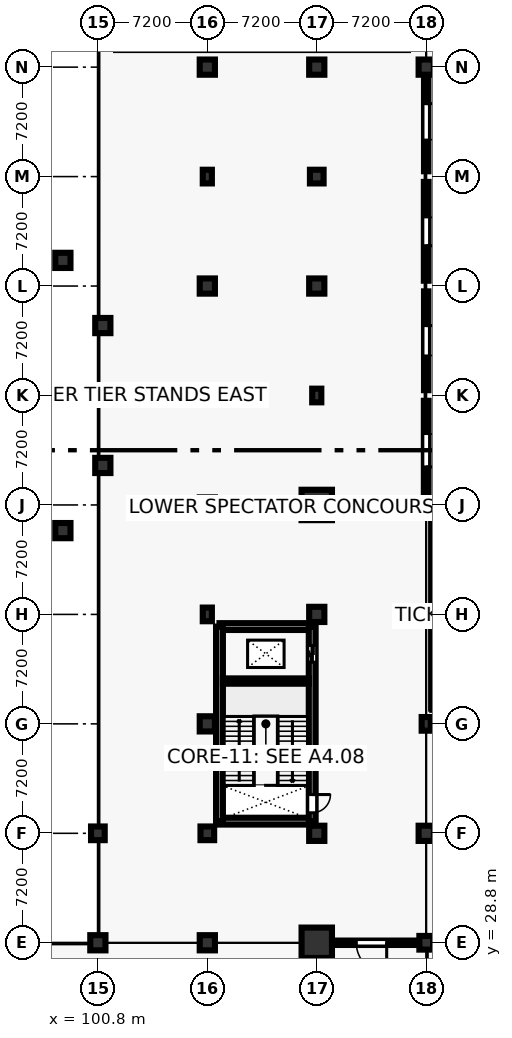
"""IFC4 building model, lengths in metres.
Left out: names, types, materials, properties, quantities, classifications, styles, units other than length and angle.
Written with IfcOpenShell. Run it as: python <this file> out.ifc"""

import sys

from ifc_helpers import new_model, si_unit, direction, frame, frame_2d, origin, origin_2d, place, context, subcontext, project, spatial, rectangle, circle, extrude, element, fill, save


model = new_model("IFC4")
c1 = context("Model", 3, precision=1e-05, world=origin(), true_north=direction((0.0, 1.0)))
c2 = subcontext(c1, "Body", "Model", "MODEL_VIEW")
j1 = project(units=[si_unit("LENGTHUNIT", "METRE"), si_unit("PLANEANGLEUNIT", "RADIAN")], contexts=[c1])
p1 = place(None, origin())
s1 = spatial("IfcSite", under=j1, at=p1, CompositionType="ELEMENT")
p2 = place(p1, origin())
s2 = spatial("IfcBuilding", under=s1, at=p2, CompositionType="ELEMENT")
p3 = place(p2, origin())
s3 = spatial("IfcBuildingStorey", under=s2, at=p3, CompositionType="ELEMENT", Elevation=0.0)
p4 = place(p3, frame((100.8, 28.8, 0.0), z_axis=(0.0, 0.0, 1.0), x_axis=(1.0, 0.0, 0.0)))
e1 = element("IfcColumn", 1, at=p4, inside=s3, PredefinedType="COLUMN", context=c2, shape_type="SweptSolid", body=[
    extrude(rectangle(XDim=1.0, YDim=1.0, at=origin_2d()), origin(), (0.0, 0.0, 1.0), 5.4),
])
p5 = place(p3, frame((100.8, 36.0, 0.0), z_axis=(0.0, 0.0, 1.0), x_axis=(1.0, 0.0, 0.0)))
e2 = element("IfcColumn", 2, at=p5, inside=s3, PredefinedType="COLUMN", context=c2, shape_type="SweptSolid", body=[
    extrude(rectangle(XDim=0.9, YDim=0.9, at=origin_2d()), origin(), (0.0, 0.0, 1.0), 5.4),
])
p6 = place(p3, frame((108.0, 28.8, 0.0), z_axis=(0.0, 0.0, 1.0), x_axis=(1.0, 0.0, 0.0)))
e3 = element("IfcColumn", 3, at=p6, inside=s3, PredefinedType="COLUMN", context=c2, shape_type="SweptSolid", body=[
    extrude(rectangle(XDim=1.0, YDim=1.0, at=origin_2d()), origin(), (0.0, 0.0, 1.0), 5.4),
])
p7 = place(p3, frame((108.0, 36.0, 0.0), z_axis=(0.0, 0.0, 1.0), x_axis=(1.0, 0.0, 0.0)))
e4 = element("IfcColumn", 4, at=p7, inside=s3, PredefinedType="COLUMN", context=c2, shape_type="SweptSolid", body=[
    extrude(rectangle(XDim=0.9, YDim=0.9, at=origin_2d()), origin(), (0.0, 0.0, 1.0), 5.4),
])
p8 = place(p3, frame((108.0, 43.2, 0.0), z_axis=(0.0, 0.0, 1.0), x_axis=(1.0, 0.0, 0.0)))
e5 = element("IfcColumn", 5, at=p8, inside=s3, PredefinedType="COLUMN", context=c2, shape_type="SweptSolid", body=[
    extrude(circle(Radius=0.5, at=origin_2d()), origin(), (0.0, 0.0, 1.0), 5.4),
])
p9 = place(p3, frame((108.0, 50.4, 0.0), z_axis=(0.0, 0.0, 1.0), x_axis=(1.0, 0.0, 0.0)))
e6 = element("IfcColumn", 6, at=p9, inside=s3, PredefinedType="COLUMN", context=c2, shape_type="SweptSolid", body=[
    extrude(rectangle(XDim=0.6, YDim=0.9, at=origin_2d()), origin(), (0.0, 0.0, 1.0), 5.4),
])
p10 = place(p3, frame((108.0, 57.6, 0.0), z_axis=(0.0, 0.0, 1.0), x_axis=(1.0, 0.0, 0.0)))
e7 = element("IfcColumn", 7, at=p10, inside=s3, PredefinedType="COLUMN", context=c2, shape_type="SweptSolid", body=[
    extrude(rectangle(XDim=1.0, YDim=1.0, at=origin_2d()), origin(), (0.0, 0.0, 1.0), 5.4),
])
p11 = place(p3, frame((108.0, 64.8, 0.0), z_axis=(0.0, 0.0, 1.0), x_axis=(1.0, 0.0, 0.0)))
e8 = element("IfcColumn", 8, at=p11, inside=s3, PredefinedType="COLUMN", context=c2, shape_type="SweptSolid", body=[
    extrude(rectangle(XDim=0.9, YDim=0.9, at=origin_2d()), origin(), (0.0, 0.0, 1.0), 5.4),
])
p12 = place(p3, frame((108.0, 72.0, 0.0), z_axis=(0.0, 0.0, 1.0), x_axis=(1.0, 0.0, 0.0)))
e9 = element("IfcColumn", 9, at=p12, inside=s3, PredefinedType="COLUMN", context=c2, shape_type="SweptSolid", body=[
    extrude(circle(Radius=0.5, at=origin_2d()), origin(), (0.0, 0.0, 1.0), 5.4),
])
p13 = place(p3, frame((108.0, 79.2, 0.0), z_axis=(0.0, 0.0, 1.0), x_axis=(1.0, 0.0, 0.0)))
e10 = element("IfcColumn", 10, at=p13, inside=s3, PredefinedType="COLUMN", context=c2, shape_type="SweptSolid", body=[
    extrude(rectangle(XDim=0.6, YDim=0.9, at=origin_2d()), origin(), (0.0, 0.0, 1.0), 5.4),
])
p14 = place(p3, frame((108.0, 86.4, 0.0), z_axis=(0.0, 0.0, 1.0), x_axis=(1.0, 0.0, 0.0)))
e11 = element("IfcColumn", 11, at=p14, inside=s3, PredefinedType="COLUMN", context=c2, shape_type="SweptSolid", body=[
    extrude(rectangle(XDim=1.0, YDim=1.0, at=origin_2d()), origin(), (0.0, 0.0, 1.0), 5.4),
])
p15 = place(p3, frame((115.2, 28.8, 0.0), z_axis=(0.0, 0.0, 1.0), x_axis=(1.0, 0.0, 0.0)))
e12 = element("IfcColumn", 12, at=p15, inside=s3, PredefinedType="COLUMN", context=c2, shape_type="SweptSolid", body=[
    extrude(circle(Radius=1.0, at=origin_2d()), origin(), (0.0, 0.0, 1.0), 5.4),
])
for number, where, z_axis, x_axis in (
    (13, (115.2, 36.0, 0.0), (0.0, 0.0, 1.0), (1.0, 0.0, 0.0)),
    (14, (115.2, 50.4, 0.0), (0.0, 0.0, 1.0), (1.0, 0.0, 0.0)),
):
    element("IfcColumn", number, at=place(p3, frame(where, z_axis=z_axis, x_axis=x_axis)), inside=s3, PredefinedType="COLUMN", context=c2, shape_type="SweptSolid", body=[
        extrude(circle(Radius=0.5, at=origin_2d()), origin(), (0.0, 0.0, 1.0), 5.4),
    ])
p16 = place(p3, frame((115.2, 57.6, 0.0), z_axis=(0.0, 0.0, 1.0), x_axis=(1.0, 0.0, 0.0)))
e15 = element("IfcColumn", 15, at=p16, inside=s3, PredefinedType="COLUMN", context=c2, shape_type="SweptSolid", body=[
    extrude(circle(Radius=1.0, at=origin_2d()), origin(), (0.0, 0.0, 1.0), 5.4),
])
p17 = place(p3, frame((115.2, 64.8, 0.0), z_axis=(0.0, 0.0, 1.0), x_axis=(1.0, 0.0, 0.0)))
e16 = element("IfcColumn", 16, at=p17, inside=s3, PredefinedType="COLUMN", context=c2, shape_type="SweptSolid", body=[
    extrude(rectangle(XDim=0.6, YDim=0.9, at=origin_2d()), origin(), (0.0, 0.0, 1.0), 5.4),
])
p18 = place(p3, frame((115.2, 72.0, 0.0), z_axis=(0.0, 0.0, 1.0), x_axis=(1.0, 0.0, 0.0)))
e17 = element("IfcColumn", 17, at=p18, inside=s3, PredefinedType="COLUMN", context=c2, shape_type="SweptSolid", body=[
    extrude(circle(Radius=0.5, at=origin_2d()), origin(), (0.0, 0.0, 1.0), 5.4),
])
p19 = place(p3, frame((115.2, 79.2, 0.0), z_axis=(0.0, 0.0, 1.0), x_axis=(1.0, 0.0, 0.0)))
e18 = element("IfcColumn", 18, at=p19, inside=s3, PredefinedType="COLUMN", context=c2, shape_type="SweptSolid", body=[
    extrude(rectangle(XDim=0.9, YDim=0.9, at=origin_2d()), origin(), (0.0, 0.0, 1.0), 5.4),
])
p20 = place(p3, frame((115.2, 86.4, 0.0), z_axis=(0.0, 0.0, 1.0), x_axis=(1.0, 0.0, 0.0)))
e19 = element("IfcColumn", 19, at=p20, inside=s3, PredefinedType="COLUMN", context=c2, shape_type="SweptSolid", body=[
    extrude(circle(Radius=0.5, at=origin_2d()), origin(), (0.0, 0.0, 1.0), 5.4),
])
p21 = place(p3, frame((122.4, 28.8, 0.0), z_axis=(0.0, 0.0, 1.0), x_axis=(1.0, 0.0, 0.0)))
e20 = element("IfcColumn", 20, at=p21, inside=s3, PredefinedType="COLUMN", context=c2, shape_type="SweptSolid", body=[
    extrude(rectangle(XDim=0.9, YDim=0.9, at=origin_2d()), origin(), (0.0, 0.0, 1.0), 5.4),
])
p22 = place(p3, frame((122.4, 36.0, 0.0), z_axis=(0.0, 0.0, 1.0), x_axis=(1.0, 0.0, 0.0)))
e21 = element("IfcColumn", 21, at=p22, inside=s3, PredefinedType="COLUMN", context=c2, shape_type="SweptSolid", body=[
    extrude(circle(Radius=0.5, at=origin_2d()), origin(), (0.0, 0.0, 1.0), 5.4),
])
p23 = place(p3, frame((122.4, 43.2, 0.0), z_axis=(0.0, 0.0, 1.0), x_axis=(1.0, 0.0, 0.0)))
e22 = element("IfcColumn", 22, at=p23, inside=s3, PredefinedType="COLUMN", context=c2, shape_type="SweptSolid", body=[
    extrude(rectangle(XDim=0.6, YDim=0.9, at=origin_2d()), origin(), (0.0, 0.0, 1.0), 5.4),
])
p24 = place(p3, frame((122.4, 50.4, 0.0), z_axis=(0.0, 0.0, 1.0), x_axis=(1.0, 0.0, 0.0)))
e23 = element("IfcColumn", 23, at=p24, inside=s3, PredefinedType="COLUMN", context=c2, shape_type="SweptSolid", body=[
    extrude(rectangle(XDim=1.0, YDim=1.0, at=origin_2d()), origin(), (0.0, 0.0, 1.0), 5.4),
])
p25 = place(p3, frame((122.4, 57.6, 0.0), z_axis=(0.0, 0.0, 1.0), x_axis=(1.0, 0.0, 0.0)))
e24 = element("IfcColumn", 24, at=p25, inside=s3, PredefinedType="COLUMN", context=c2, shape_type="SweptSolid", body=[
    extrude(rectangle(XDim=0.9, YDim=0.9, at=origin_2d()), origin(), (0.0, 0.0, 1.0), 5.4),
])
p26 = place(p3, frame((122.4, 86.4, 0.0), z_axis=(0.0, 0.0, 1.0), x_axis=(1.0, 0.0, 0.0)))
e25 = element("IfcColumn", 25, at=p26, inside=s3, PredefinedType="COLUMN", context=c2, shape_type="SweptSolid", body=[
    extrude(circle(Radius=0.5, at=origin_2d()), origin(), (0.0, 0.0, 1.0), 5.4),
])
for number, where, z_axis, x_axis in (
    (26, (108.8, 36.8, 0.0), (0.0, 0.0, 1.0), (1.0, 0.0, 0.0)),
    (27, (108.8, 49.6, 0.0), (0.0, 0.0, 1.0), (1.0, 0.0, 0.0)),
):
    element("IfcWall", number, at=place(p3, frame(where, z_axis=z_axis, x_axis=x_axis)), inside=s3, PredefinedType="SHEAR", context=c2, shape_type="SweptSolid", body=[
        extrude(rectangle(XDim=6.1, YDim=0.45, at=frame_2d((3.05, 0.0))), origin(), (0.0, 0.0, 1.0), 5.06),
    ])
p27 = place(p3, frame((108.8, 36.8, 0.0), z_axis=(0.0, 0.0, 1.0), x_axis=(0.0, 1.0, 0.0)))
e28 = element("IfcWall", 28, at=p27, inside=s3, PredefinedType="SHEAR", context=c2, shape_type="SweptSolid", body=[
    extrude(rectangle(XDim=12.8, YDim=0.45, at=frame_2d((6.4, 0.0))), origin(), (0.0, 0.0, 1.0), 5.06),
])
p28 = place(p3, frame((114.9, 36.8, 0.0), z_axis=(0.0, 0.0, 1.0), x_axis=(0.0, 1.0, 0.0)))
e29 = element("IfcWall", 29, at=p28, inside=s3, PredefinedType="SHEAR", context=c2, shape_type="SweptSolid", body=[
    extrude(rectangle(XDim=12.8, YDim=0.45, at=frame_2d((6.4, 0.0))), origin(), (0.0, 0.0, 1.0), 5.06),
])
p29 = place(p28, frame((0.55, 0.0, 0.0)))
e30 = element("IfcOpeningElement", 30, at=p29, cuts=e29, PredefinedType="OPENING", context=c2, shape_type="SweptSolid", body=[
    extrude(rectangle(XDim=1.2, YDim=2.25, at=frame_2d((0.6, 1.125))), frame((0.0, 0.235, 0.0), z_axis=(0.0, -1.0, 0.0), x_axis=(1.0, 0.0, 0.0)), (0.0, 0.0, 1.0), 0.47),
])
p30 = place(p28, frame((10.458, 0.0, 0.0)))
e31 = element("IfcOpeningElement", 31, at=p30, cuts=e29, PredefinedType="OPENING", context=c2, shape_type="SweptSolid", body=[
    extrude(rectangle(XDim=1.1, YDim=2.2, at=frame_2d((0.55, 1.1))), frame((0.0, 0.235, 0.0), z_axis=(0.0, -1.0, 0.0), x_axis=(1.0, 0.0, 0.0)), (0.0, 0.0, 1.0), 0.47),
])
p31 = place(p3, frame((109.025, 46.016, 0.0), z_axis=(0.0, 0.0, 1.0), x_axis=(1.0, 0.0, 0.0)))
e32 = element("IfcWall", 32, at=p31, inside=s3, PredefinedType="SHEAR", context=c2, shape_type="SweptSolid", body=[
    extrude(rectangle(XDim=5.65, YDim=0.35, at=frame_2d((2.825, 0.0))), origin(), (0.0, 0.0, 1.0), 5.06),
])
for number, where, z_axis, x_axis in (
    (33, (102.32, 64.8, 0.0), (0.0, 0.0, 1.0), (1.0, 0.0, 0.0)),
    (34, (101.125, 69.401, 0.0), (0.0, 0.0, 1.0), (1.0, 0.0, 0.0)),
    (35, (98.498, 73.688, 0.0), (0.0, 0.0, 1.0), (1.0, 0.0, 0.0)),
    (36, (98.498, 55.912, 0.0), (0.0, 0.0, 1.0), (1.0, 0.0, 0.0)),
    (37, (101.125, 60.199, 0.0), (0.0, 0.0, 1.0), (1.0, 0.0, 0.0)),
):
    element("IfcColumn", number, at=place(p3, frame(where, z_axis=z_axis, x_axis=x_axis)), inside=s3, PredefinedType="COLUMN", context=c2, shape_type="SweptSolid", body=[
        extrude(circle(Radius=0.5, at=origin_2d()), origin(), (0.0, 0.0, 1.0), 5.4),
    ])
p32 = place(p3, frame((115.55, 28.8, 0.0), z_axis=(0.0, 0.0, 1.0), x_axis=(1.0, 0.0, 0.0)))
e38 = element("IfcWall", 38, at=p32, inside=s3, PredefinedType="SOLIDWALL", context=c2, shape_type="SweptSolid", body=[
    extrude(rectangle(XDim=6.5, YDim=0.29, at=frame_2d((3.25, 0.0))), origin(), (0.0, 0.0, 1.0), 4.1),
])
p33 = place(p32, frame((2.25, 0.0, 0.0)))
e39 = element("IfcOpeningElement", 39, at=p33, cuts=e38, PredefinedType="OPENING", context=c2, shape_type="SweptSolid", body=[
    extrude(rectangle(XDim=2.0, YDim=2.45, at=frame_2d((1.0, 1.225))), frame((0.0, 0.155, 0.0), z_axis=(0.0, -1.0, 0.0), x_axis=(1.0, 0.0, 0.0)), (0.0, 0.0, 1.0), 0.31),
])
p34 = place(p3, frame((122.4, 57.95, 0.0), z_axis=(0.0, 0.0, 1.0), x_axis=(0.0, 1.0, 0.0)))
e40 = element("IfcWall", 40, at=p34, inside=s3, PredefinedType="SOLIDWALL", context=c2, shape_type="SweptSolid", body=[
    extrude(rectangle(XDim=6.5, YDim=0.31, at=frame_2d((3.25, 0.0))), origin(), (0.0, 0.0, 1.0), 4.1),
])
p35 = place(p34, frame((2.15, 0.0, 0.0)))
e41 = element("IfcOpeningElement", 41, at=p35, cuts=e40, PredefinedType="OPENING", context=c2, shape_type="SweptSolid", body=[
    extrude(rectangle(XDim=2.2, YDim=2.5, at=frame_2d((1.1, 1.25))), frame((0.0, 0.165, 0.0), z_axis=(0.0, -1.0, 0.0), x_axis=(1.0, 0.0, 0.0)), (0.0, 0.0, 1.0), 0.33),
])
p36 = place(p3, frame((122.4, 65.15, 0.0), z_axis=(0.0, 0.0, 1.0), x_axis=(0.0, 1.0, 0.0)))
e42 = element("IfcWall", 42, at=p36, inside=s3, PredefinedType="SOLIDWALL", context=c2, shape_type="SweptSolid", body=[
    extrude(rectangle(XDim=6.5, YDim=0.29, at=frame_2d((3.25, 0.0))), origin(), (0.0, 0.0, 1.0), 4.1),
])
p37 = place(p36, frame((2.25, 0.0, 0.0)))
e43 = element("IfcOpeningElement", 43, at=p37, cuts=e42, PredefinedType="OPENING", context=c2, shape_type="SweptSolid", body=[
    extrude(rectangle(XDim=2.0, YDim=2.45, at=frame_2d((1.0, 1.225))), frame((0.0, 0.155, 0.0), z_axis=(0.0, -1.0, 0.0), x_axis=(1.0, 0.0, 0.0)), (0.0, 0.0, 1.0), 0.31),
])
p38 = place(p3, frame((122.4, 72.35, 0.0), z_axis=(0.0, 0.0, 1.0), x_axis=(0.0, 1.0, 0.0)))
e44 = element("IfcWall", 44, at=p38, inside=s3, PredefinedType="SOLIDWALL", context=c2, shape_type="SweptSolid", body=[
    extrude(rectangle(XDim=6.5, YDim=0.31, at=frame_2d((3.25, 0.0))), origin(), (0.0, 0.0, 1.0), 4.1),
])
p39 = place(p38, frame((2.3, 0.0, 0.0)))
e45 = element("IfcOpeningElement", 45, at=p39, cuts=e44, PredefinedType="OPENING", context=c2, shape_type="SweptSolid", body=[
    extrude(rectangle(XDim=1.9, YDim=2.4, at=frame_2d((0.95, 1.2))), frame((0.0, 0.165, 0.0), z_axis=(0.0, -1.0, 0.0), x_axis=(1.0, 0.0, 0.0)), (0.0, 0.0, 1.0), 0.33),
])
p40 = place(p3, frame((122.4, 79.55, 0.0), z_axis=(0.0, 0.0, 1.0), x_axis=(0.0, 1.0, 0.0)))
e46 = element("IfcWall", 46, at=p40, inside=s3, PredefinedType="SOLIDWALL", context=c2, shape_type="SweptSolid", body=[
    extrude(rectangle(XDim=6.5, YDim=0.29, at=frame_2d((3.25, 0.0))), origin(), (0.0, 0.0, 1.0), 4.1),
])
p41 = place(p40, frame((2.05, 0.0, 0.0)))
e47 = element("IfcOpeningElement", 47, at=p41, cuts=e46, PredefinedType="OPENING", context=c2, shape_type="SweptSolid", body=[
    extrude(rectangle(XDim=2.4, YDim=2.6, at=frame_2d((1.2, 1.3))), frame((0.0, 0.155, 0.0), z_axis=(0.0, -1.0, 0.0), x_axis=(1.0, 0.0, 0.0)), (0.0, 0.0, 1.0), 0.31),
])
p42 = place(p3, frame((122.65, 86.4, 0.0), z_axis=(0.0, 0.0, 1.0), x_axis=(1.0, 0.0, 0.0)))
e48 = element("IfcWall", 48, at=p42, inside=s3, PredefinedType="SOLIDWALL", context=c2, shape_type="SweptSolid", body=[
    extrude(rectangle(XDim=6.7, YDim=0.24, at=frame_2d((3.35, 0.0))), origin(), (0.0, 0.0, 1.0), 4.1),
])
p43 = place(p42, frame((1.75, 0.0, 0.9)))
e49 = element("IfcOpeningElement", 49, at=p43, cuts=e48, PredefinedType="OPENING", context=c2, shape_type="SweptSolid", body=[
    extrude(rectangle(XDim=3.2, YDim=1.6, at=frame_2d((1.6, 0.8))), frame((0.0, 0.13, 0.0), z_axis=(0.0, -1.0, 0.0), x_axis=(1.0, 0.0, 0.0)), (0.0, 0.0, 1.0), 0.26),
])
p44 = place(p3, frame((122.8, 56.6, 0.0), z_axis=(0.0, 0.0, 1.0), x_axis=(0.0, -1.0, 0.0)))
e50 = element("IfcWall", 50, at=p44, inside=s3, PredefinedType="PARTITIONING", context=c2, shape_type="SweptSolid", body=[
    extrude(rectangle(XDim=12.4, YDim=0.15, at=frame_2d((6.2, 0.0))), origin(), (0.0, 0.0, 1.0), 4.1),
])
p45 = place(p33, frame((2.0, 0.0, 0.0), z_axis=(0.0, 0.0, 1.0), x_axis=(-1.0, 0.0, 0.0)))
e51 = element("IfcDoor", 51, at=p45, inside=s3, OperationType="SINGLE_SWING_RIGHT", PredefinedType="DOOR", context=c2, shape_type="SweptSolid", body=[
    extrude(rectangle(XDim=2.0, YDim=2.45, at=frame_2d((1.0, 1.225))), frame((0.0, 0.025, 0.0), z_axis=(0.0, -1.0, 0.0), x_axis=(1.0, 0.0, 0.0)), (0.0, 0.0, 1.0), 0.05),
])
fill(e39, e51)
p46 = place(p35, frame((2.2, 0.0, 0.0), z_axis=(0.0, 0.0, 1.0), x_axis=(-1.0, 0.0, 0.0)))
e52 = element("IfcDoor", 52, at=p46, inside=s3, OperationType="SINGLE_SWING_LEFT", PredefinedType="DOOR", context=c2, shape_type="SweptSolid", body=[
    extrude(rectangle(XDim=2.2, YDim=2.5, at=frame_2d((1.1, 1.25))), frame((0.0, 0.025, 0.0), z_axis=(0.0, -1.0, 0.0), x_axis=(1.0, 0.0, 0.0)), (0.0, 0.0, 1.0), 0.05),
])
fill(e41, e52)
p47 = place(p37, frame((2.0, 0.0, 0.0), z_axis=(0.0, 0.0, 1.0), x_axis=(-1.0, 0.0, 0.0)))
e53 = element("IfcDoor", 53, at=p47, inside=s3, OperationType="SINGLE_SWING_RIGHT", PredefinedType="DOOR", context=c2, shape_type="SweptSolid", body=[
    extrude(rectangle(XDim=2.0, YDim=2.45, at=frame_2d((1.0, 1.225))), frame((0.0, 0.025, 0.0), z_axis=(0.0, -1.0, 0.0), x_axis=(1.0, 0.0, 0.0)), (0.0, 0.0, 1.0), 0.05),
])
fill(e43, e53)
p48 = place(p39, frame((1.9, 0.0, 0.0), z_axis=(0.0, 0.0, 1.0), x_axis=(-1.0, 0.0, 0.0)))
e54 = element("IfcDoor", 54, at=p48, inside=s3, OperationType="SINGLE_SWING_LEFT", PredefinedType="DOOR", context=c2, shape_type="SweptSolid", body=[
    extrude(rectangle(XDim=1.9, YDim=2.4, at=frame_2d((0.95, 1.2))), frame((0.0, 0.025, 0.0), z_axis=(0.0, -1.0, 0.0), x_axis=(1.0, 0.0, 0.0)), (0.0, 0.0, 1.0), 0.05),
])
fill(e45, e54)
p49 = place(p41, frame((2.4, 0.0, 0.0), z_axis=(0.0, 0.0, 1.0), x_axis=(-1.0, 0.0, 0.0)))
e55 = element("IfcDoor", 55, at=p49, inside=s3, OperationType="SINGLE_SWING_RIGHT", PredefinedType="DOOR", context=c2, shape_type="SweptSolid", body=[
    extrude(rectangle(XDim=2.4, YDim=2.6, at=frame_2d((1.2, 1.3))), frame((0.0, 0.025, 0.0), z_axis=(0.0, -1.0, 0.0), x_axis=(1.0, 0.0, 0.0)), (0.0, 0.0, 1.0), 0.05),
])
fill(e47, e55)
p50 = place(p29, frame((1.2, 0.0, 0.0), z_axis=(0.0, 0.0, 1.0), x_axis=(-1.0, 0.0, 0.0)))
e56 = element("IfcDoor", 56, at=p50, inside=s3, OperationType="SINGLE_SWING_RIGHT", PredefinedType="DOOR", context=c2, shape_type="SweptSolid", body=[
    extrude(rectangle(XDim=1.2, YDim=2.25, at=frame_2d((0.6, 1.125))), frame((0.0, 0.025, 0.0), z_axis=(0.0, -1.0, 0.0), x_axis=(1.0, 0.0, 0.0)), (0.0, 0.0, 1.0), 0.05),
])
fill(e30, e56)
p51 = place(p30, origin())
e57 = element("IfcDoor", 57, at=p51, inside=s3, OperationType="SLIDING_TO_LEFT", PredefinedType="DOOR", context=c2, shape_type="SweptSolid", body=[
    extrude(rectangle(XDim=1.1, YDim=2.2, at=frame_2d((0.55, 1.1))), frame((0.0, 0.025, 0.0), z_axis=(0.0, -1.0, 0.0), x_axis=(1.0, 0.0, 0.0)), (0.0, 0.0, 1.0), 0.05),
])
fill(e31, e57)
save(model, sys.argv[1])
